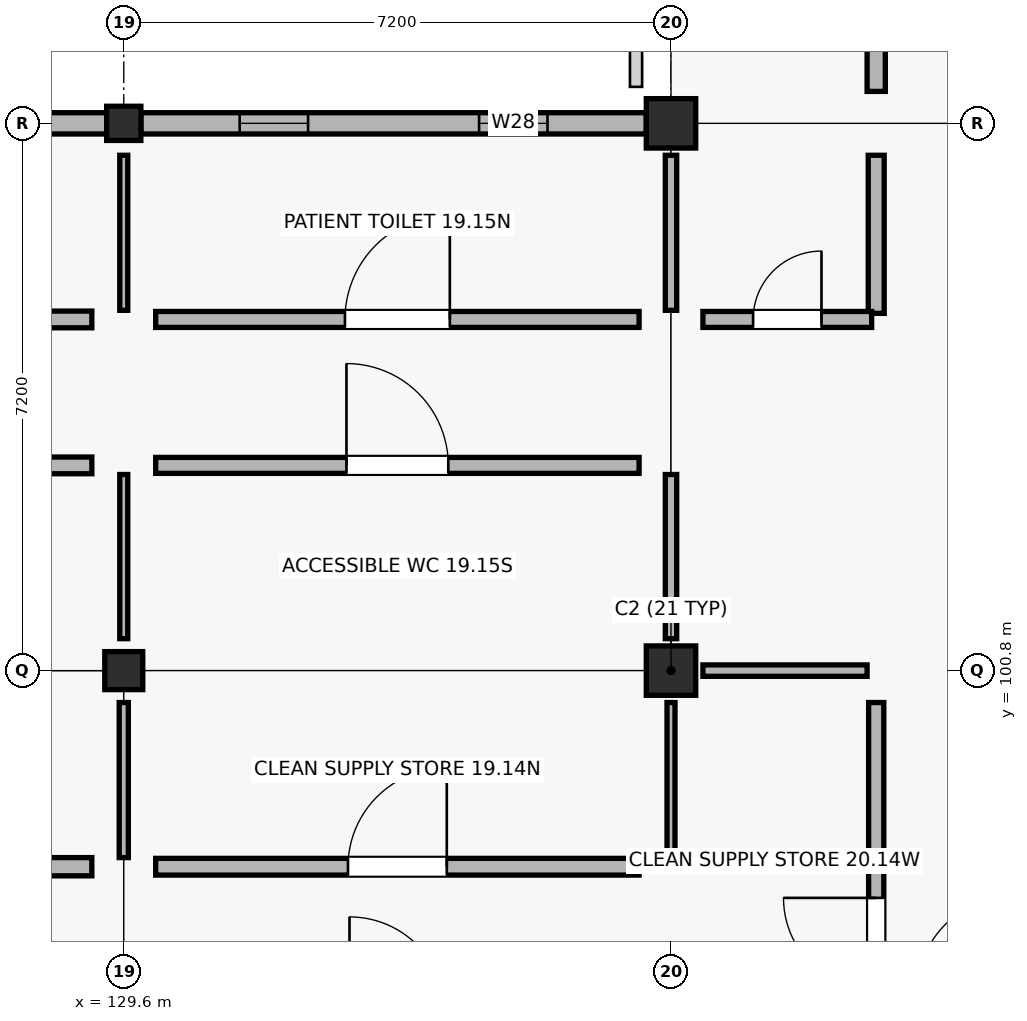
"""IFC4 building model, lengths in metres.
Left out: names, types, materials, properties, quantities, classifications, styles, units other than length and angle.
Written with IfcOpenShell. Run it as: python <this file> out.ifc"""

import sys

from ifc_helpers import new_model, si_unit, direction, frame, frame_2d, origin, origin_2d, place, context, subcontext, project, spatial, rectangle, extrude, element, fill, save


model = new_model("IFC4")
c1 = context("Model", 3, precision=1e-05, world=origin(), true_north=direction((0.0, 1.0)))
c2 = subcontext(c1, "Body", "Model", "MODEL_VIEW")
j1 = project(units=[si_unit("LENGTHUNIT", "METRE"), si_unit("PLANEANGLEUNIT", "RADIAN")], contexts=[c1])
p1 = place(None, origin())
s1 = spatial("IfcSite", under=j1, at=p1, CompositionType="ELEMENT")
p2 = place(p1, origin())
s2 = spatial("IfcBuilding", under=s1, at=p2, CompositionType="ELEMENT")
p3 = place(p2, frame((0.0, 0.0, 4.5)))
s3 = spatial("IfcBuildingStorey", under=s2, at=p3, CompositionType="ELEMENT", Elevation=4.5)
p4 = place(p3, frame((129.6, 100.8, 0.0), z_axis=(0.0, 0.0, 1.0), x_axis=(1.0, 0.0, 0.0)))
e1 = element("IfcColumn", 1, at=p4, inside=s3, PredefinedType="COLUMN", context=c2, shape_type="SweptSolid", body=[
    extrude(rectangle(XDim=0.5, YDim=0.5, at=origin_2d()), origin(), (0.0, 0.0, 1.0), 4.28),
])
p5 = place(p3, frame((129.6, 108.0, 0.0), z_axis=(0.0, 0.0, 1.0), x_axis=(1.0, 0.0, 0.0)))
e2 = element("IfcColumn", 2, at=p5, inside=s3, PredefinedType="COLUMN", context=c2, shape_type="SweptSolid", body=[
    extrude(rectangle(XDim=0.45, YDim=0.45, at=origin_2d()), origin(), (0.0, 0.0, 1.0), 4.28),
])
for number, where, z_axis, x_axis in (
    (3, (136.8, 100.8, 0.0), (0.0, 0.0, 1.0), (1.0, 0.0, 0.0)),
    (4, (136.8, 108.0, 0.0), (0.0, 0.0, 1.0), (1.0, 0.0, 0.0)),
):
    element("IfcColumn", number, at=place(p3, frame(where, z_axis=z_axis, x_axis=x_axis)), inside=s3, PredefinedType="COLUMN", context=c2, shape_type="SweptSolid", body=[
        extrude(rectangle(XDim=0.65, YDim=0.65, at=origin_2d()), origin(), (0.0, 0.0, 1.0), 4.5),
    ])
p6 = place(p3, frame((129.375, 108.0, 0.0), z_axis=(0.0, 0.0, 1.0), x_axis=(-1.0, 0.0, 0.0)))
e5 = element("IfcWall", 5, at=p6, inside=s3, PredefinedType="STANDARD", context=c2, shape_type="SweptSolid", body=[
    extrude(rectangle(XDim=6.725, YDim=0.28, at=frame_2d((3.363, 0.0))), origin(), (0.0, 0.0, 1.0), 3.47),
])
p7 = place(p6, frame((1.15, 0.0, 0.9)))
e6 = element("IfcOpeningElement", 6, at=p7, cuts=e5, PredefinedType="OPENING", context=c2, shape_type="SweptSolid", body=[
    extrude(rectangle(XDim=1.2, YDim=1.5, at=frame_2d((0.6, 0.75))), frame((0.0, 0.15, 0.0), z_axis=(0.0, -1.0, 0.0), x_axis=(1.0, 0.0, 0.0)), (0.0, 0.0, 1.0), 0.3),
])
p8 = place(p6, frame((4.375, 0.0, 0.9)))
e7 = element("IfcOpeningElement", 7, at=p8, cuts=e5, PredefinedType="OPENING", context=c2, shape_type="SweptSolid", body=[
    extrude(rectangle(XDim=1.2, YDim=1.5, at=frame_2d((0.6, 0.75))), frame((0.0, 0.15, 0.0), z_axis=(0.0, -1.0, 0.0), x_axis=(1.0, 0.0, 0.0)), (0.0, 0.0, 1.0), 0.3),
])
p9 = place(p3, frame((136.475, 108.0, 0.0), z_axis=(0.0, 0.0, 1.0), x_axis=(-1.0, 0.0, 0.0)))
e8 = element("IfcWall", 8, at=p9, inside=s3, PredefinedType="STANDARD", context=c2, shape_type="SweptSolid", body=[
    extrude(rectangle(XDim=6.65, YDim=0.28, at=frame_2d((3.325, 0.0))), origin(), (0.0, 0.0, 1.0), 3.47),
])
p10 = place(p9, frame((1.3, 0.0, 0.9)))
e9 = element("IfcOpeningElement", 9, at=p10, cuts=e8, PredefinedType="OPENING", context=c2, shape_type="SweptSolid", body=[
    extrude(rectangle(XDim=0.9, YDim=1.62, at=frame_2d((0.45, 0.81))), frame((0.0, 0.15, 0.0), z_axis=(0.0, -1.0, 0.0), x_axis=(1.0, 0.0, 0.0)), (0.0, 0.0, 1.0), 0.3),
])
p11 = place(p9, frame((4.45, 0.0, 0.9)))
e10 = element("IfcOpeningElement", 10, at=p11, cuts=e8, PredefinedType="OPENING", context=c2, shape_type="SweptSolid", body=[
    extrude(rectangle(XDim=0.9, YDim=1.62, at=frame_2d((0.45, 0.81))), frame((0.0, 0.15, 0.0), z_axis=(0.0, -1.0, 0.0), x_axis=(1.0, 0.0, 0.0)), (0.0, 0.0, 1.0), 0.3),
])
p12 = place(p3, frame((122.82, 98.22, 0.0), z_axis=(0.0, 0.0, 1.0), x_axis=(1.0, 0.0, 0.0)))
e11 = element("IfcWall", 11, at=p12, inside=s3, PredefinedType="SOLIDWALL", context=c2, shape_type="SweptSolid", body=[
    extrude(rectangle(XDim=6.36, YDim=0.24, at=frame_2d((3.18, 0.0))), origin(), (0.0, 0.0, 1.0), 3.36),
])
p13 = place(p12, frame((2.53, 0.0, 0.0)))
e12 = element("IfcOpeningElement", 12, at=p13, cuts=e11, PredefinedType="OPENING", context=c2, shape_type="SweptSolid", body=[
    extrude(rectangle(XDim=1.3, YDim=2.15, at=frame_2d((0.65, 1.075))), frame((0.0, 0.13, 0.0), z_axis=(0.0, -1.0, 0.0), x_axis=(1.0, 0.0, 0.0)), (0.0, 0.0, 1.0), 0.26),
])
p14 = place(p3, frame((129.6, 98.34, 0.0), z_axis=(0.0, 0.0, 1.0), x_axis=(0.0, 1.0, 0.0)))
e13 = element("IfcWall", 13, at=p14, inside=s3, PredefinedType="PARTITIONING", context=c2, shape_type="SweptSolid", body=[
    extrude(rectangle(XDim=2.04, YDim=0.12, at=frame_2d((1.02, 0.0))), origin(), (0.0, 0.0, 1.0), 3.36),
])
p15 = place(p3, frame((122.82, 103.5, 0.0), z_axis=(0.0, 0.0, 1.0), x_axis=(1.0, 0.0, 0.0)))
e14 = element("IfcWall", 14, at=p15, inside=s3, PredefinedType="SOLIDWALL", context=c2, shape_type="SweptSolid", body=[
    extrude(rectangle(XDim=6.36, YDim=0.22, at=frame_2d((3.18, 0.0))), origin(), (0.0, 0.0, 1.0), 3.36),
])
p16 = place(p15, frame((2.59, 0.0, 0.0)))
e15 = element("IfcOpeningElement", 15, at=p16, cuts=e14, PredefinedType="OPENING", context=c2, shape_type="SweptSolid", body=[
    extrude(rectangle(XDim=1.18, YDim=2.09, at=frame_2d((0.59, 1.045))), frame((0.0, 0.12, 0.0), z_axis=(0.0, -1.0, 0.0), x_axis=(1.0, 0.0, 0.0)), (0.0, 0.0, 1.0), 0.24),
])
p17 = place(p3, frame((129.6, 101.22, 0.0), z_axis=(0.0, 0.0, 1.0), x_axis=(0.0, 1.0, 0.0)))
e16 = element("IfcWall", 16, at=p17, inside=s3, PredefinedType="PARTITIONING", context=c2, shape_type="SweptSolid", body=[
    extrude(rectangle(XDim=2.16, YDim=0.105, at=frame_2d((1.08, 0.0))), origin(), (0.0, 0.0, 1.0), 3.36),
])
p18 = place(p3, frame((122.82, 105.42, 0.0), z_axis=(0.0, 0.0, 1.0), x_axis=(1.0, 0.0, 0.0)))
e17 = element("IfcWall", 17, at=p18, inside=s3, PredefinedType="SOLIDWALL", context=c2, shape_type="SweptSolid", body=[
    extrude(rectangle(XDim=6.36, YDim=0.22, at=frame_2d((3.18, 0.0))), origin(), (0.0, 0.0, 1.0), 3.36),
])
p19 = place(p18, frame((2.57, 0.0, 0.0)))
e18 = element("IfcOpeningElement", 18, at=p19, cuts=e17, PredefinedType="OPENING", context=c2, shape_type="SweptSolid", body=[
    extrude(rectangle(XDim=1.22, YDim=2.09, at=frame_2d((0.61, 1.045))), frame((0.0, 0.12, 0.0), z_axis=(0.0, -1.0, 0.0), x_axis=(1.0, 0.0, 0.0)), (0.0, 0.0, 1.0), 0.24),
])
p20 = place(p3, frame((129.6, 105.54, 0.0), z_axis=(0.0, 0.0, 1.0), x_axis=(0.0, 1.0, 0.0)))
e19 = element("IfcWall", 19, at=p20, inside=s3, PredefinedType="PARTITIONING", context=c2, shape_type="SweptSolid", body=[
    extrude(rectangle(XDim=2.04, YDim=0.105, at=frame_2d((1.02, 0.0))), origin(), (0.0, 0.0, 1.0), 3.36),
])
p21 = place(p3, frame((130.02, 98.22, 0.0), z_axis=(0.0, 0.0, 1.0), x_axis=(1.0, 0.0, 0.0)))
e20 = element("IfcWall", 20, at=p21, inside=s3, PredefinedType="SOLIDWALL", context=c2, shape_type="SweptSolid", body=[
    extrude(rectangle(XDim=6.36, YDim=0.22, at=frame_2d((3.18, 0.0))), origin(), (0.0, 0.0, 1.0), 3.36),
])
p22 = place(p21, frame((2.53, 0.0, 0.0)))
e21 = element("IfcOpeningElement", 21, at=p22, cuts=e20, PredefinedType="OPENING", context=c2, shape_type="SweptSolid", body=[
    extrude(rectangle(XDim=1.3, YDim=2.09, at=frame_2d((0.65, 1.045))), frame((0.0, 0.12, 0.0), z_axis=(0.0, -1.0, 0.0), x_axis=(1.0, 0.0, 0.0)), (0.0, 0.0, 1.0), 0.24),
])
p23 = place(p3, frame((136.8, 98.34, 0.0), z_axis=(0.0, 0.0, 1.0), x_axis=(0.0, 1.0, 0.0)))
e22 = element("IfcWall", 22, at=p23, inside=s3, PredefinedType="PARTITIONING", context=c2, shape_type="SweptSolid", body=[
    extrude(rectangle(XDim=2.04, YDim=0.105, at=frame_2d((1.02, 0.0))), origin(), (0.0, 0.0, 1.0), 3.36),
])
p24 = place(p3, frame((130.02, 103.5, 0.0), z_axis=(0.0, 0.0, 1.0), x_axis=(1.0, 0.0, 0.0)))
e23 = element("IfcWall", 23, at=p24, inside=s3, PredefinedType="PLUMBINGWALL", context=c2, shape_type="SweptSolid", body=[
    extrude(rectangle(XDim=6.36, YDim=0.21, at=frame_2d((3.18, 0.0))), origin(), (0.0, 0.0, 1.0), 3.36),
])
p25 = place(p24, frame((2.51, 0.0, 0.0)))
e24 = element("IfcOpeningElement", 24, at=p25, cuts=e23, PredefinedType="OPENING", context=c2, shape_type="SweptSolid", body=[
    extrude(rectangle(XDim=1.34, YDim=2.09, at=frame_2d((0.67, 1.045))), frame((0.0, 0.115, 0.0), z_axis=(0.0, -1.0, 0.0), x_axis=(1.0, 0.0, 0.0)), (0.0, 0.0, 1.0), 0.23),
])
p26 = place(p3, frame((136.8, 101.22, 0.0), z_axis=(0.0, 0.0, 1.0), x_axis=(0.0, 1.0, 0.0)))
e25 = element("IfcWall", 25, at=p26, inside=s3, PredefinedType="PARTITIONING", context=c2, shape_type="SweptSolid", body=[
    extrude(rectangle(XDim=2.16, YDim=0.15, at=frame_2d((1.08, 0.0))), origin(), (0.0, 0.0, 1.0), 3.36),
])
p27 = place(p3, frame((130.02, 105.42, 0.0), z_axis=(0.0, 0.0, 1.0), x_axis=(1.0, 0.0, 0.0)))
e26 = element("IfcWall", 26, at=p27, inside=s3, PredefinedType="PLUMBINGWALL", context=c2, shape_type="SweptSolid", body=[
    extrude(rectangle(XDim=6.36, YDim=0.21, at=frame_2d((3.18, 0.0))), origin(), (0.0, 0.0, 1.0), 3.36),
])
p28 = place(p27, frame((2.49, 0.0, 0.0)))
e27 = element("IfcOpeningElement", 27, at=p28, cuts=e26, PredefinedType="OPENING", context=c2, shape_type="SweptSolid", body=[
    extrude(rectangle(XDim=1.38, YDim=2.09, at=frame_2d((0.69, 1.045))), frame((0.0, 0.115, 0.0), z_axis=(0.0, -1.0, 0.0), x_axis=(1.0, 0.0, 0.0)), (0.0, 0.0, 1.0), 0.23),
])
p29 = place(p3, frame((136.8, 105.54, 0.0), z_axis=(0.0, 0.0, 1.0), x_axis=(0.0, 1.0, 0.0)))
e28 = element("IfcWall", 28, at=p29, inside=s3, PredefinedType="PARTITIONING", context=c2, shape_type="SweptSolid", body=[
    extrude(rectangle(XDim=2.04, YDim=0.15, at=frame_2d((1.02, 0.0))), origin(), (0.0, 0.0, 1.0), 3.36),
])
p30 = place(p3, frame((139.5, 94.02, 0.0), z_axis=(0.0, 0.0, 1.0), x_axis=(0.0, 1.0, 0.0)))
e29 = element("IfcWall", 29, at=p30, inside=s3, PredefinedType="SOLIDWALL", context=c2, shape_type="SweptSolid", body=[
    extrude(rectangle(XDim=6.36, YDim=0.2, at=frame_2d((3.18, 0.0))), origin(), (0.0, 0.0, 1.0), 3.36),
])
p31 = place(p30, frame((2.57, 0.0, 0.0)))
e30 = element("IfcOpeningElement", 30, at=p31, cuts=e29, PredefinedType="OPENING", context=c2, shape_type="SweptSolid", body=[
    extrude(rectangle(XDim=1.22, YDim=2.14, at=frame_2d((0.61, 1.07))), frame((0.0, 0.11, 0.0), z_axis=(0.0, -1.0, 0.0), x_axis=(1.0, 0.0, 0.0)), (0.0, 0.0, 1.0), 0.22),
])
p32 = place(p3, frame((137.22, 100.8, 0.0), z_axis=(0.0, 0.0, 1.0), x_axis=(1.0, 0.0, 0.0)))
e31 = element("IfcWall", 31, at=p32, inside=s3, PredefinedType="PARTITIONING", context=c2, shape_type="SweptSolid", body=[
    extrude(rectangle(XDim=2.16, YDim=0.15, at=frame_2d((1.08, 0.0))), origin(), (0.0, 0.0, 1.0), 3.36),
])
p33 = place(p3, frame((139.5, 105.5, 0.0), z_axis=(0.0, 0.0, 1.0), x_axis=(0.0, 1.0, 0.0)))
e32 = element("IfcWall", 32, at=p33, inside=s3, PredefinedType="PLUMBINGWALL", context=c2, shape_type="SweptSolid", body=[
    extrude(rectangle(XDim=2.08, YDim=0.21, at=frame_2d((1.04, 0.0))), origin(), (0.0, 0.0, 1.0), 3.36),
])
p34 = place(p3, frame((137.22, 105.42, 0.0), z_axis=(0.0, 0.0, 1.0), x_axis=(1.0, 0.0, 0.0)))
e33 = element("IfcWall", 33, at=p34, inside=s3, PredefinedType="PLUMBINGWALL", context=c2, shape_type="SweptSolid", body=[
    extrude(rectangle(XDim=2.22, YDim=0.21, at=frame_2d((1.11, 0.0))), origin(), (0.0, 0.0, 1.0), 3.36),
])
p35 = place(p34, frame((0.66, 0.0, 0.0)))
e34 = element("IfcOpeningElement", 34, at=p35, cuts=e33, PredefinedType="OPENING", context=c2, shape_type="SweptSolid", body=[
    extrude(rectangle(XDim=0.9, YDim=2.04, at=frame_2d((0.45, 1.02))), frame((0.0, 0.115, 0.0), z_axis=(0.0, -1.0, 0.0), x_axis=(1.0, 0.0, 0.0)), (0.0, 0.0, 1.0), 0.23),
])
p36 = place(p3, frame((139.5, 108.42, 0.0), z_axis=(0.0, 0.0, 1.0), x_axis=(0.0, 1.0, 0.0)))
e35 = element("IfcWall", 35, at=p36, inside=s3, PredefinedType="SOLIDWALL", context=c2, shape_type="SweptSolid", body=[
    extrude(rectangle(XDim=6.36, YDim=0.24, at=frame_2d((3.18, 0.0))), origin(), (0.0, 0.0, 1.0), 3.36),
])
p37 = place(p36, frame((2.505, 0.0, 0.0)))
e36 = element("IfcOpeningElement", 36, at=p37, cuts=e35, PredefinedType="OPENING", context=c2, shape_type="SweptSolid", body=[
    extrude(rectangle(XDim=1.35, YDim=2.2, at=frame_2d((0.675, 1.1))), frame((0.0, 0.13, 0.0), z_axis=(0.0, -1.0, 0.0), x_axis=(1.0, 0.0, 0.0)), (0.0, 0.0, 1.0), 0.26),
])
p38 = place(p10, origin())
e37 = element("IfcWindow", 37, at=p38, inside=s3, PartitioningType="SINGLE_PANEL", PredefinedType="WINDOW", context=c2, shape_type="SweptSolid", body=[
    extrude(rectangle(XDim=0.9, YDim=1.62, at=frame_2d((0.45, 0.81))), frame((0.0, 0.03, 0.0), z_axis=(0.0, -1.0, 0.0), x_axis=(1.0, 0.0, 0.0)), (0.0, 0.0, 1.0), 0.06),
])
fill(e9, e37)
p39 = place(p11, origin())
e38 = element("IfcWindow", 38, at=p39, inside=s3, PartitioningType="SINGLE_PANEL", PredefinedType="WINDOW", context=c2, shape_type="SweptSolid", body=[
    extrude(rectangle(XDim=0.9, YDim=1.62, at=frame_2d((0.45, 0.81))), frame((0.0, 0.03, 0.0), z_axis=(0.0, -1.0, 0.0), x_axis=(1.0, 0.0, 0.0)), (0.0, 0.0, 1.0), 0.06),
])
fill(e10, e38)
p40 = place(p22, origin())
e39 = element("IfcDoor", 39, at=p40, inside=s3, OperationType="SINGLE_SWING_RIGHT", PredefinedType="DOOR", context=c2, shape_type="SweptSolid", body=[
    extrude(rectangle(XDim=1.3, YDim=2.09, at=frame_2d((0.65, 1.045))), frame((0.0, 0.025, 0.0), z_axis=(0.0, -1.0, 0.0), x_axis=(1.0, 0.0, 0.0)), (0.0, 0.0, 1.0), 0.05),
])
fill(e21, e39)
p41 = place(p25, origin())
e40 = element("IfcDoor", 40, at=p41, inside=s3, OperationType="SINGLE_SWING_LEFT", PredefinedType="DOOR", context=c2, shape_type="SweptSolid", body=[
    extrude(rectangle(XDim=1.34, YDim=2.09, at=frame_2d((0.67, 1.045))), frame((0.0, 0.025, 0.0), z_axis=(0.0, -1.0, 0.0), x_axis=(1.0, 0.0, 0.0)), (0.0, 0.0, 1.0), 0.05),
])
fill(e24, e40)
p42 = place(p28, origin())
e41 = element("IfcDoor", 41, at=p42, inside=s3, OperationType="SINGLE_SWING_RIGHT", PredefinedType="DOOR", context=c2, shape_type="SweptSolid", body=[
    extrude(rectangle(XDim=1.38, YDim=2.09, at=frame_2d((0.69, 1.045))), frame((0.0, 0.025, 0.0), z_axis=(0.0, -1.0, 0.0), x_axis=(1.0, 0.0, 0.0)), (0.0, 0.0, 1.0), 0.05),
])
fill(e27, e41)
p43 = place(p31, origin())
e42 = element("IfcDoor", 42, at=p43, inside=s3, OperationType="SINGLE_SWING_RIGHT", PredefinedType="DOOR", context=c2, shape_type="SweptSolid", body=[
    extrude(rectangle(XDim=1.22, YDim=2.14, at=frame_2d((0.61, 1.07))), frame((0.0, 0.025, 0.0), z_axis=(0.0, -1.0, 0.0), x_axis=(1.0, 0.0, 0.0)), (0.0, 0.0, 1.0), 0.05),
])
fill(e30, e42)
p44 = place(p35, origin())
e43 = element("IfcDoor", 43, at=p44, inside=s3, OperationType="SINGLE_SWING_RIGHT", PredefinedType="DOOR", context=c2, shape_type="SweptSolid", body=[
    extrude(rectangle(XDim=0.9, YDim=2.04, at=frame_2d((0.45, 1.02))), frame((0.0, 0.025, 0.0), z_axis=(0.0, -1.0, 0.0), x_axis=(1.0, 0.0, 0.0)), (0.0, 0.0, 1.0), 0.05),
])
fill(e34, e43)
save(model, sys.argv[1])
